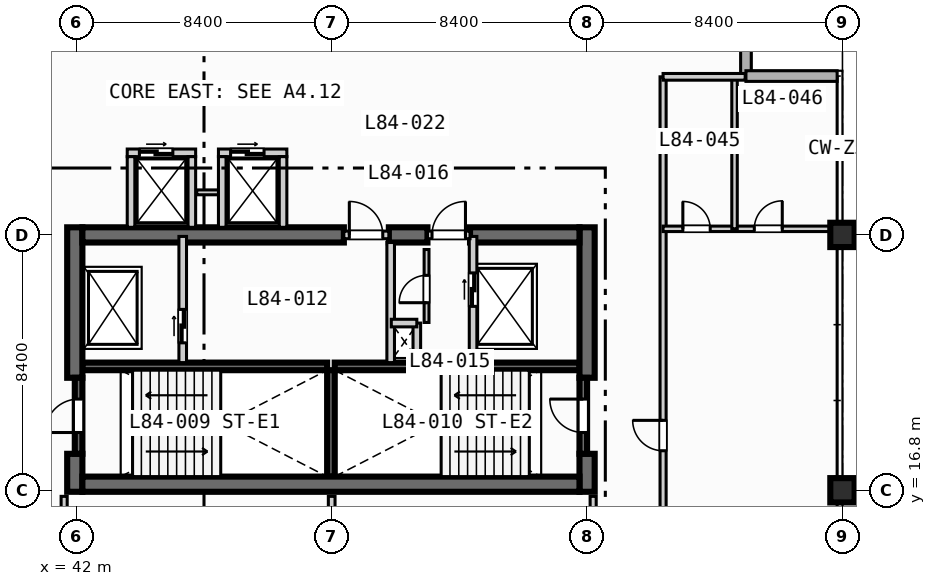
"""IFC4 building model, lengths in metres.
Left out: names, types, materials, properties, quantities, classifications, styles, units other than length and angle.
Written with IfcOpenShell. Run it as: python <this file> out.ifc"""

import sys

from ifc_helpers import new_model, si_unit, direction, frame, frame_2d, origin, origin_2d, place, context, subcontext, project, spatial, rectangle, extrude, element, fill, save


model = new_model("IFC4")
c1 = context("Model", 3, precision=1e-05, world=origin(), true_north=direction((0.0, 1.0)))
c2 = subcontext(c1, "Body", "Model", "MODEL_VIEW")
j1 = project(units=[si_unit("LENGTHUNIT", "METRE"), si_unit("PLANEANGLEUNIT", "RADIAN")], contexts=[c1])
p1 = place(None, origin())
s1 = spatial("IfcSite", under=j1, at=p1, CompositionType="ELEMENT")
p2 = place(p1, origin())
s2 = spatial("IfcBuilding", under=s1, at=p2, CompositionType="ELEMENT")
p3 = place(p2, frame((0.0, 0.0, 339.8)))
s3 = spatial("IfcBuildingStorey", under=s2, at=p3, CompositionType="ELEMENT", Elevation=339.8)
for number, where, z_axis, x_axis in (
    (1, (42.2, 20.875, 0.0), (0.0, 0.0, 1.0), (1.0, 0.0, 0.0)),
    (2, (50.5, 20.875, 0.0), (0.0, 0.0, 1.0), (1.0, 0.0, 0.0)),
):
    element("IfcWall", number, at=place(p3, frame(where, z_axis=z_axis, x_axis=x_axis)), inside=s3, PredefinedType="SOLIDWALL", context=c2, shape_type="SweptSolid", body=[
        extrude(rectangle(XDim=8.05, YDim=0.25, at=frame_2d((4.025, 0.0))), origin(), (0.0, 0.0, 1.0), 3.67),
    ])
p4 = place(p3, frame((50.375, 17.25, 0.0), z_axis=(0.0, 0.0, 1.0), x_axis=(0.0, 1.0, 0.0)))
e3 = element("IfcWall", 3, at=p4, inside=s3, PredefinedType="SOLIDWALL", context=c2, shape_type="SweptSolid", body=[
    extrude(rectangle(XDim=3.5, YDim=0.25, at=frame_2d((1.75, 0.0))), origin(), (0.0, 0.0, 1.0), 3.67),
])
p5 = place(p3, frame((41.95, 16.75, 0.0), z_axis=(0.0, 0.0, 1.0), x_axis=(0.0, 1.0, 0.0)))
e4 = element("IfcWall", 4, at=p5, inside=s3, PredefinedType="SHEAR", context=c2, shape_type="SweptSolid", body=[
    extrude(rectangle(XDim=1.25, YDim=0.5, at=frame_2d((0.625, 0.0))), origin(), (0.0, 0.0, 1.0), 3.67),
])
p6 = place(p3, frame((41.95, 20.5, 0.0), z_axis=(0.0, 0.0, 1.0), x_axis=(0.0, 1.0, 0.0)))
e5 = element("IfcWall", 5, at=p6, inside=s3, PredefinedType="SHEAR", context=c2, shape_type="SweptSolid", body=[
    extrude(rectangle(XDim=4.95, YDim=0.5, at=frame_2d((2.475, 0.0))), origin(), (0.0, 0.0, 1.0), 3.67),
])
p7 = place(p3, frame((58.8, 16.75, 0.0), z_axis=(0.0, 0.0, 1.0), x_axis=(0.0, 1.0, 0.0)))
e6 = element("IfcWall", 6, at=p7, inside=s3, PredefinedType="SHEAR", context=c2, shape_type="SweptSolid", body=[
    extrude(rectangle(XDim=1.25, YDim=0.5, at=frame_2d((0.625, 0.0))), origin(), (0.0, 0.0, 1.0), 3.67),
])
p8 = place(p3, frame((58.8, 20.5, 0.0), z_axis=(0.0, 0.0, 1.0), x_axis=(0.0, 1.0, 0.0)))
e7 = element("IfcWall", 7, at=p8, inside=s3, PredefinedType="SHEAR", context=c2, shape_type="SweptSolid", body=[
    extrude(rectangle(XDim=4.95, YDim=0.5, at=frame_2d((2.475, 0.0))), origin(), (0.0, 0.0, 1.0), 3.67),
])
p9 = place(p3, frame((42.2, 17.0, 0.0), z_axis=(0.0, 0.0, 1.0), x_axis=(1.0, 0.0, 0.0)))
e8 = element("IfcWall", 8, at=p9, inside=s3, PredefinedType="SHEAR", context=c2, shape_type="SweptSolid", body=[
    extrude(rectangle(XDim=16.35, YDim=0.5, at=frame_2d((8.175, 0.0))), origin(), (0.0, 0.0, 1.0), 3.67),
])
p10 = place(p3, frame((42.2, 25.2, 0.0), z_axis=(0.0, 0.0, 1.0), x_axis=(1.0, 0.0, 0.0)))
e9 = element("IfcWall", 9, at=p10, inside=s3, PredefinedType="SHEAR", context=c2, shape_type="SweptSolid", body=[
    extrude(rectangle(XDim=8.6, YDim=0.5, at=frame_2d((4.3, 0.0))), origin(), (0.0, 0.0, 1.0), 3.67),
])
p11 = place(p3, frame((52.28, 25.2, 0.0), z_axis=(0.0, 0.0, 1.0), x_axis=(1.0, 0.0, 0.0)))
e10 = element("IfcWall", 10, at=p11, inside=s3, PredefinedType="SHEAR", context=c2, shape_type="SweptSolid", body=[
    extrude(rectangle(XDim=1.27, YDim=0.5, at=frame_2d((0.635, 0.0))), origin(), (0.0, 0.0, 1.0), 3.67),
])
p12 = place(p3, frame((54.95, 25.2, 0.0), z_axis=(0.0, 0.0, 1.0), x_axis=(1.0, 0.0, 0.0)))
e11 = element("IfcWall", 11, at=p12, inside=s3, PredefinedType="SHEAR", context=c2, shape_type="SweptSolid", body=[
    extrude(rectangle(XDim=3.6, YDim=0.5, at=frame_2d((1.8, 0.0))), origin(), (0.0, 0.0, 1.0), 3.67),
])
for number, where, z_axis, x_axis in (
    (12, (67.2, 16.8, 0.0), (0.0, 0.0, 1.0), (1.0, 0.0, 0.0)),
    (13, (67.2, 25.2, 0.0), (0.0, 0.0, 1.0), (1.0, 0.0, 0.0)),
):
    element("IfcColumn", number, at=place(p3, frame(where, z_axis=z_axis, x_axis=x_axis)), inside=s3, PredefinedType="COLUMN", context=c2, shape_type="SweptSolid", body=[
        extrude(rectangle(XDim=0.8, YDim=0.8, at=origin_2d()), origin(), (0.0, 0.0, 1.0), 3.9),
    ])
for number, where, z_axis, x_axis in (
    (14, (64.025, 33.425, 0.0), (0.0, 0.0, 1.0), (0.0, -1.0, 0.0)),
    (15, (64.025, 30.425, 0.0), (0.0, 0.0, 1.0), (1.0, 0.0, 0.0)),
):
    element("IfcWall", number, at=place(p3, frame(where, z_axis=z_axis, x_axis=x_axis)), inside=s3, PredefinedType="STANDARD", context=c2, shape_type="SweptSolid", body=[
        extrude(rectangle(XDim=3.0, YDim=0.35, at=frame_2d((1.5, 0.0))), origin(), (0.0, 0.0, 1.0), 3.67),
    ])
p13 = place(p3, frame((42.075, 18.0, 0.0), z_axis=(0.0, 0.0, 1.0), x_axis=(0.0, 1.0, 0.0)))
e16 = element("IfcWall", 16, at=p13, inside=s3, PredefinedType="SOLIDWALL", context=c2, shape_type="SweptSolid", body=[
    extrude(rectangle(XDim=2.5, YDim=0.25, at=frame_2d((1.25, 0.0))), origin(), (0.0, 0.0, 1.0), 3.67),
])
p14 = place(p13, frame((0.7, 0.0, 0.0)))
e17 = element("IfcOpeningElement", 17, at=p14, cuts=e16, PredefinedType="OPENING", context=c2, shape_type="SweptSolid", body=[
    extrude(rectangle(XDim=1.1, YDim=2.15, at=frame_2d((0.55, 1.075))), frame((0.0, 0.135, 0.0), z_axis=(0.0, -1.0, 0.0), x_axis=(1.0, 0.0, 0.0)), (0.0, 0.0, 1.0), 0.27),
])
p15 = place(p3, frame((58.675, 18.0, 0.0), z_axis=(0.0, 0.0, 1.0), x_axis=(0.0, 1.0, 0.0)))
e18 = element("IfcWall", 18, at=p15, inside=s3, PredefinedType="SOLIDWALL", context=c2, shape_type="SweptSolid", body=[
    extrude(rectangle(XDim=2.5, YDim=0.25, at=frame_2d((1.25, 0.0))), origin(), (0.0, 0.0, 1.0), 3.67),
])
p16 = place(p15, frame((0.7, 0.0, 0.0)))
e19 = element("IfcOpeningElement", 19, at=p16, cuts=e18, PredefinedType="OPENING", context=c2, shape_type="SweptSolid", body=[
    extrude(rectangle(XDim=1.1, YDim=2.15, at=frame_2d((0.55, 1.075))), frame((0.0, 0.135, 0.0), z_axis=(0.0, -1.0, 0.0), x_axis=(1.0, 0.0, 0.0)), (0.0, 0.0, 1.0), 0.27),
])
p17 = place(p3, frame((45.5, 21.0, 0.0), z_axis=(0.0, 0.0, 1.0), x_axis=(0.0, 1.0, 0.0)))
e20 = element("IfcWall", 20, at=p17, inside=s3, PredefinedType="SOLIDWALL", context=c2, shape_type="SweptSolid", body=[
    extrude(rectangle(XDim=4.15, YDim=0.25, at=frame_2d((2.075, 0.0))), origin(), (0.0, 0.0, 1.0), 3.67),
])
p18 = place(p17, frame((0.65, 0.0, 0.0)))
e21 = element("IfcOpeningElement", 21, at=p18, cuts=e20, PredefinedType="OPENING", context=c2, shape_type="SweptSolid", body=[
    extrude(rectangle(XDim=1.1, YDim=2.15, at=frame_2d((0.55, 1.075))), frame((0.0, 0.135, 0.0), z_axis=(0.0, -1.0, 0.0), x_axis=(1.0, 0.0, 0.0)), (0.0, 0.0, 1.0), 0.27),
])
p19 = place(p3, frame((50.8, 25.2, 0.0), z_axis=(0.0, 0.0, 1.0), x_axis=(1.0, 0.0, 0.0)))
e22 = element("IfcWall", 22, at=p19, inside=s3, PredefinedType="SOLIDWALL", context=c2, shape_type="SweptSolid", body=[
    extrude(rectangle(XDim=1.48, YDim=0.25, at=frame_2d((0.74, 0.0))), origin(), (0.0, 0.0, 1.0), 3.67),
])
p20 = place(p19, frame((0.18, 0.0, 0.0)))
e23 = element("IfcOpeningElement", 23, at=p20, cuts=e22, PredefinedType="OPENING", context=c2, shape_type="SweptSolid", body=[
    extrude(rectangle(XDim=1.1, YDim=2.15, at=frame_2d((0.55, 1.075))), frame((0.0, 0.135, 0.0), z_axis=(0.0, -1.0, 0.0), x_axis=(1.0, 0.0, 0.0)), (0.0, 0.0, 1.0), 0.27),
])
p21 = place(p3, frame((52.34, 21.0, 0.0), z_axis=(0.0, 0.0, 1.0), x_axis=(0.0, 1.0, 0.0)))
e24 = element("IfcWall", 24, at=p21, inside=s3, PredefinedType="SOLIDWALL", context=c2, shape_type="SweptSolid", body=[
    extrude(rectangle(XDim=3.95, YDim=0.25, at=frame_2d((1.975, 0.0))), origin(), (0.0, 0.0, 1.0), 3.67),
])
p22 = place(p3, frame((55.05, 21.0, 0.0), z_axis=(0.0, 0.0, 1.0), x_axis=(0.0, 1.0, 0.0)))
e25 = element("IfcWall", 25, at=p22, inside=s3, PredefinedType="SOLIDWALL", context=c2, shape_type="SweptSolid", body=[
    extrude(rectangle(XDim=4.15, YDim=0.25, at=frame_2d((2.075, 0.0))), origin(), (0.0, 0.0, 1.0), 3.67),
])
p23 = place(p22, frame((1.85, 0.0, 0.0)))
e26 = element("IfcOpeningElement", 26, at=p23, cuts=e25, PredefinedType="OPENING", context=c2, shape_type="SweptSolid", body=[
    extrude(rectangle(XDim=1.1, YDim=2.15, at=frame_2d((0.55, 1.075))), frame((0.0, 0.135, 0.0), z_axis=(0.0, -1.0, 0.0), x_axis=(1.0, 0.0, 0.0)), (0.0, 0.0, 1.0), 0.27),
])
p24 = place(p3, frame((53.55, 25.2, 0.0), z_axis=(0.0, 0.0, 1.0), x_axis=(1.0, 0.0, 0.0)))
e27 = element("IfcWall", 27, at=p24, inside=s3, PredefinedType="SOLIDWALL", context=c2, shape_type="SweptSolid", body=[
    extrude(rectangle(XDim=1.4, YDim=0.25, at=frame_2d((0.7, 0.0))), origin(), (0.0, 0.0, 1.0), 3.67),
])
p25 = place(p24, frame((0.15, 0.0, 0.0)))
e28 = element("IfcOpeningElement", 28, at=p25, cuts=e27, PredefinedType="OPENING", context=c2, shape_type="SweptSolid", body=[
    extrude(rectangle(XDim=1.1, YDim=2.15, at=frame_2d((0.55, 1.075))), frame((0.0, 0.135, 0.0), z_axis=(0.0, -1.0, 0.0), x_axis=(1.0, 0.0, 0.0)), (0.0, 0.0, 1.0), 0.27),
])
p26 = place(p3, frame((53.2, 21.0, 0.0), z_axis=(0.0, 0.0, 1.0), x_axis=(0.0, 1.0, 0.0)))
e29 = element("IfcWall", 29, at=p26, inside=s3, PredefinedType="SOLIDWALL", context=c2, shape_type="SweptSolid", body=[
    extrude(rectangle(XDim=1.3, YDim=0.25, at=frame_2d((0.65, 0.0))), origin(), (0.0, 0.0, 1.0), 3.67),
])
p27 = place(p3, frame((52.36, 22.3, 0.0), z_axis=(0.0, 0.0, 1.0), x_axis=(1.0, 0.0, 0.0)))
e30 = element("IfcWall", 30, at=p27, inside=s3, PredefinedType="SOLIDWALL", context=c2, shape_type="SweptSolid", body=[
    extrude(rectangle(XDim=0.84, YDim=0.25, at=frame_2d((0.42, 0.0))), origin(), (0.0, 0.0, 1.0), 3.67),
])
p28 = place(p3, frame((53.52, 22.32, 0.0), z_axis=(0.0, 0.0, 1.0), x_axis=(0.0, 1.0, 0.0)))
e31 = element("IfcWall", 31, at=p28, inside=s3, PredefinedType="PARTITIONING", context=c2, shape_type="SweptSolid", body=[
    extrude(rectangle(XDim=2.4, YDim=0.16, at=frame_2d((1.2, 0.0))), origin(), (0.0, 0.0, 1.0), 3.67),
])
p29 = place(p28, frame((0.65, 0.0, 0.0)))
e32 = element("IfcOpeningElement", 32, at=p29, cuts=e31, PredefinedType="OPENING", context=c2, shape_type="SweptSolid", body=[
    extrude(rectangle(XDim=0.9, YDim=2.1, at=frame_2d((0.45, 1.05))), frame((0.0, 0.09, 0.0), z_axis=(0.0, -1.0, 0.0), x_axis=(1.0, 0.0, 0.0)), (0.0, 0.0, 1.0), 0.18),
])
p30 = place(p3, frame((43.675, 27.9, 0.0), z_axis=(0.0, 0.0, 1.0), x_axis=(1.0, 0.0, 0.0)))
e33 = element("IfcWall", 33, at=p30, inside=s3, PredefinedType="SOLIDWALL", context=c2, shape_type="SweptSolid", body=[
    extrude(rectangle(XDim=2.25, YDim=0.25, at=frame_2d((1.125, 0.0))), origin(), (0.0, 0.0, 1.0), 3.67),
])
p31 = place(p30, frame((0.4, 0.0, 0.0)))
e34 = element("IfcOpeningElement", 34, at=p31, cuts=e33, PredefinedType="OPENING", context=c2, shape_type="SweptSolid", body=[
    extrude(rectangle(XDim=1.1, YDim=2.15, at=frame_2d((0.55, 1.075))), frame((0.0, 0.135, 0.0), z_axis=(0.0, -1.0, 0.0), x_axis=(1.0, 0.0, 0.0)), (0.0, 0.0, 1.0), 0.27),
])
for number, where, z_axis, x_axis in (
    (35, (43.8, 25.45, 0.0), (0.0, 0.0, 1.0), (0.0, 1.0, 0.0)),
    (36, (45.8, 25.45, 0.0), (0.0, 0.0, 1.0), (0.0, 1.0, 0.0)),
):
    element("IfcWall", number, at=place(p3, frame(where, z_axis=z_axis, x_axis=x_axis)), inside=s3, PredefinedType="SOLIDWALL", context=c2, shape_type="SweptSolid", body=[
        extrude(rectangle(XDim=2.325, YDim=0.25, at=frame_2d((1.163, 0.0))), origin(), (0.0, 0.0, 1.0), 3.67),
    ])
p32 = place(p3, frame((45.96, 26.6, 0.0), z_axis=(0.0, 0.0, 1.0), x_axis=(1.0, 0.0, 0.0)))
e37 = element("IfcWall", 37, at=p32, inside=s3, PredefinedType="PARTITIONING", context=c2, shape_type="SweptSolid", body=[
    extrude(rectangle(XDim=0.88, YDim=0.16, at=frame_2d((0.44, 0.0))), origin(), (0.0, 0.0, 1.0), 3.67),
])
p33 = place(p3, frame((46.675, 27.9, 0.0), z_axis=(0.0, 0.0, 1.0), x_axis=(1.0, 0.0, 0.0)))
e38 = element("IfcWall", 38, at=p33, inside=s3, PredefinedType="SOLIDWALL", context=c2, shape_type="SweptSolid", body=[
    extrude(rectangle(XDim=2.25, YDim=0.25, at=frame_2d((1.125, 0.0))), origin(), (0.0, 0.0, 1.0), 3.67),
])
p34 = place(p33, frame((0.4, 0.0, 0.0)))
e39 = element("IfcOpeningElement", 39, at=p34, cuts=e38, PredefinedType="OPENING", context=c2, shape_type="SweptSolid", body=[
    extrude(rectangle(XDim=1.1, YDim=2.15, at=frame_2d((0.55, 1.075))), frame((0.0, 0.135, 0.0), z_axis=(0.0, -1.0, 0.0), x_axis=(1.0, 0.0, 0.0)), (0.0, 0.0, 1.0), 0.27),
])
for number, where, z_axis, x_axis in (
    (40, (46.8, 25.45, 0.0), (0.0, 0.0, 1.0), (0.0, 1.0, 0.0)),
    (41, (48.8, 25.45, 0.0), (0.0, 0.0, 1.0), (0.0, 1.0, 0.0)),
):
    element("IfcWall", number, at=place(p3, frame(where, z_axis=z_axis, x_axis=x_axis)), inside=s3, PredefinedType="SOLIDWALL", context=c2, shape_type="SweptSolid", body=[
        extrude(rectangle(XDim=2.325, YDim=0.25, at=frame_2d((1.163, 0.0))), origin(), (0.0, 0.0, 1.0), 3.67),
    ])
p35 = place(p3, frame((41.6, 8.65, 0.0), z_axis=(0.0, 0.0, 1.0), x_axis=(0.0, 1.0, 0.0)))
e42 = element("IfcWall", 42, at=p35, inside=s3, PredefinedType="PARTITIONING", context=c2, shape_type="SweptSolid", body=[
    extrude(rectangle(XDim=7.95, YDim=0.2, at=frame_2d((3.975, 0.0))), origin(), (0.0, 0.0, 1.0), 3.67),
])
p36 = place(p35, frame((2.2, 0.0, 0.0)))
e43 = element("IfcOpeningElement", 43, at=p36, cuts=e42, PredefinedType="OPENING", context=c2, shape_type="SweptSolid", body=[
    extrude(rectangle(XDim=0.92, YDim=2.1, at=frame_2d((0.46, 1.05))), frame((0.0, 0.11, 0.0), z_axis=(0.0, -1.0, 0.0), x_axis=(1.0, 0.0, 0.0)), (0.0, 0.0, 1.0), 0.22),
])
p37 = place(p3, frame((59.0, 8.65, 0.0), z_axis=(0.0, 0.0, 1.0), x_axis=(0.0, 1.0, 0.0)))
e44 = element("IfcWall", 44, at=p37, inside=s3, PredefinedType="PARTITIONING", context=c2, shape_type="SweptSolid", body=[
    extrude(rectangle(XDim=7.95, YDim=0.2, at=frame_2d((3.975, 0.0))), origin(), (0.0, 0.0, 1.0), 3.207),
])
p38 = place(p37, frame((2.2, 0.0, 0.0)))
e45 = element("IfcOpeningElement", 45, at=p38, cuts=e44, PredefinedType="OPENING", context=c2, shape_type="SweptSolid", body=[
    extrude(rectangle(XDim=0.92, YDim=2.1, at=frame_2d((0.46, 1.05))), frame((0.0, 0.11, 0.0), z_axis=(0.0, -1.0, 0.0), x_axis=(1.0, 0.0, 0.0)), (0.0, 0.0, 1.0), 0.22),
])
p39 = place(p3, frame((50.4, 8.65, 0.0), z_axis=(0.0, 0.0, 1.0), x_axis=(0.0, 1.0, 0.0)))
e46 = element("IfcWall", 46, at=p39, inside=s3, PredefinedType="PARTITIONING", context=c2, shape_type="SweptSolid", body=[
    extrude(rectangle(XDim=7.95, YDim=0.22, at=frame_2d((3.975, 0.0))), origin(), (0.0, 0.0, 1.0), 3.07),
])
p40 = place(p3, frame((61.3, 11.6, 0.0), z_axis=(0.0, 0.0, 1.0), x_axis=(0.0, 1.0, 0.0)))
e47 = element("IfcWall", 47, at=p40, inside=s3, PredefinedType="PARTITIONING", context=c2, shape_type="SweptSolid", body=[
    extrude(rectangle(XDim=18.8, YDim=0.2, at=frame_2d((9.4, 0.0))), origin(), (0.0, 0.0, 1.0), 3.67),
])
p41 = place(p40, frame((6.5, 0.0, 0.0)))
e48 = element("IfcOpeningElement", 48, at=p41, cuts=e47, PredefinedType="OPENING", context=c2, shape_type="SweptSolid", body=[
    extrude(rectangle(XDim=1.0, YDim=2.15, at=frame_2d((0.5, 1.075))), frame((0.0, 0.11, 0.0), z_axis=(0.0, -1.0, 0.0), x_axis=(1.0, 0.0, 0.0)), (0.0, 0.0, 1.0), 0.22),
])
p42 = place(p3, frame((61.3, 25.4, 0.0), z_axis=(0.0, 0.0, 1.0), x_axis=(1.0, 0.0, 0.0)))
e49 = element("IfcWall", 49, at=p42, inside=s3, PredefinedType="PLUMBINGWALL", context=c2, shape_type="SweptSolid", body=[
    extrude(rectangle(XDim=5.5, YDim=0.18, at=frame_2d((2.75, 0.0))), origin(), (0.0, 0.0, 1.0), 3.07),
])
p43 = place(p42, frame((0.65, 0.0, 0.0)))
e50 = element("IfcOpeningElement", 50, at=p43, cuts=e49, PredefinedType="OPENING", context=c2, shape_type="SweptSolid", body=[
    extrude(rectangle(XDim=0.9, YDim=2.1, at=frame_2d((0.45, 1.05))), frame((0.0, 0.1, 0.0), z_axis=(0.0, -1.0, 0.0), x_axis=(1.0, 0.0, 0.0)), (0.0, 0.0, 1.0), 0.2),
])
p44 = place(p42, frame((3.0, 0.0, 0.0)))
e51 = element("IfcOpeningElement", 51, at=p44, cuts=e49, PredefinedType="OPENING", context=c2, shape_type="SweptSolid", body=[
    extrude(rectangle(XDim=0.92, YDim=2.1, at=frame_2d((0.46, 1.05))), frame((0.0, 0.1, 0.0), z_axis=(0.0, -1.0, 0.0), x_axis=(1.0, 0.0, 0.0)), (0.0, 0.0, 1.0), 0.2),
])
p45 = place(p3, frame((63.65, 25.4, 0.0), z_axis=(0.0, 0.0, 1.0), x_axis=(0.0, 1.0, 0.0)))
e52 = element("IfcWall", 52, at=p45, inside=s3, PredefinedType="PLUMBINGWALL", context=c2, shape_type="SweptSolid", body=[
    extrude(rectangle(XDim=5.0, YDim=0.18, at=frame_2d((2.5, 0.0))), origin(), (0.0, 0.0, 1.0), 3.67),
])
p46 = place(p3, frame((61.3, 30.4, 0.0), z_axis=(0.0, 0.0, 1.0), x_axis=(1.0, 0.0, 0.0)))
e53 = element("IfcWall", 53, at=p46, inside=s3, PredefinedType="PARTITIONING", context=c2, shape_type="SweptSolid", body=[
    extrude(rectangle(XDim=2.7, YDim=0.22, at=frame_2d((1.35, 0.0))), origin(), (0.0, 0.0, 1.0), 3.67),
])
p47 = place(p14, origin())
e54 = element("IfcDoor", 54, at=p47, inside=s3, OperationType="SINGLE_SWING_LEFT", PredefinedType="DOOR", context=c2, shape_type="SweptSolid", body=[
    extrude(rectangle(XDim=1.1, YDim=2.15, at=frame_2d((0.55, 1.075))), frame((0.0, 0.025, 0.0), z_axis=(0.0, -1.0, 0.0), x_axis=(1.0, 0.0, 0.0)), (0.0, 0.0, 1.0), 0.05),
])
fill(e17, e54)
p48 = place(p16, origin())
e55 = element("IfcDoor", 55, at=p48, inside=s3, OperationType="SINGLE_SWING_RIGHT", PredefinedType="DOOR", context=c2, shape_type="SweptSolid", body=[
    extrude(rectangle(XDim=1.1, YDim=2.15, at=frame_2d((0.55, 1.075))), frame((0.0, 0.025, 0.0), z_axis=(0.0, -1.0, 0.0), x_axis=(1.0, 0.0, 0.0)), (0.0, 0.0, 1.0), 0.05),
])
fill(e19, e55)
p49 = place(p18, origin())
e56 = element("IfcDoor", 56, at=p49, inside=s3, OperationType="SLIDING_TO_LEFT", PredefinedType="DOOR", context=c2, shape_type="SweptSolid", body=[
    extrude(rectangle(XDim=1.1, YDim=2.15, at=frame_2d((0.55, 1.075))), frame((0.0, 0.025, 0.0), z_axis=(0.0, -1.0, 0.0), x_axis=(1.0, 0.0, 0.0)), (0.0, 0.0, 1.0), 0.05),
])
fill(e21, e56)
p50 = place(p20, origin())
e57 = element("IfcDoor", 57, at=p50, inside=s3, OperationType="SINGLE_SWING_LEFT", PredefinedType="DOOR", context=c2, shape_type="SweptSolid", body=[
    extrude(rectangle(XDim=1.1, YDim=2.15, at=frame_2d((0.55, 1.075))), frame((0.0, 0.025, 0.0), z_axis=(0.0, -1.0, 0.0), x_axis=(1.0, 0.0, 0.0)), (0.0, 0.0, 1.0), 0.05),
])
fill(e23, e57)
p51 = place(p23, origin())
e58 = element("IfcDoor", 58, at=p51, inside=s3, OperationType="SLIDING_TO_LEFT", PredefinedType="DOOR", context=c2, shape_type="SweptSolid", body=[
    extrude(rectangle(XDim=1.1, YDim=2.15, at=frame_2d((0.55, 1.075))), frame((0.0, 0.025, 0.0), z_axis=(0.0, -1.0, 0.0), x_axis=(1.0, 0.0, 0.0)), (0.0, 0.0, 1.0), 0.05),
])
fill(e26, e58)
p52 = place(p25, origin())
e59 = element("IfcDoor", 59, at=p52, inside=s3, OperationType="SINGLE_SWING_RIGHT", PredefinedType="DOOR", context=c2, shape_type="SweptSolid", body=[
    extrude(rectangle(XDim=1.1, YDim=2.15, at=frame_2d((0.55, 1.075))), frame((0.0, 0.025, 0.0), z_axis=(0.0, -1.0, 0.0), x_axis=(1.0, 0.0, 0.0)), (0.0, 0.0, 1.0), 0.05),
])
fill(e28, e59)
p53 = place(p29, origin())
e60 = element("IfcDoor", 60, at=p53, inside=s3, OperationType="SINGLE_SWING_LEFT", PredefinedType="DOOR", context=c2, shape_type="SweptSolid", body=[
    extrude(rectangle(XDim=0.9, YDim=2.1, at=frame_2d((0.45, 1.05))), frame((0.0, 0.025, 0.0), z_axis=(0.0, -1.0, 0.0), x_axis=(1.0, 0.0, 0.0)), (0.0, 0.0, 1.0), 0.05),
])
fill(e32, e60)
p54 = place(p31, origin())
e61 = element("IfcDoor", 61, at=p54, inside=s3, OperationType="SLIDING_TO_LEFT", PredefinedType="DOOR", context=c2, shape_type="SweptSolid", body=[
    extrude(rectangle(XDim=1.1, YDim=2.15, at=frame_2d((0.55, 1.075))), frame((0.0, 0.025, 0.0), z_axis=(0.0, -1.0, 0.0), x_axis=(1.0, 0.0, 0.0)), (0.0, 0.0, 1.0), 0.05),
])
fill(e34, e61)
p55 = place(p34, origin())
e62 = element("IfcDoor", 62, at=p55, inside=s3, OperationType="SLIDING_TO_LEFT", PredefinedType="DOOR", context=c2, shape_type="SweptSolid", body=[
    extrude(rectangle(XDim=1.1, YDim=2.15, at=frame_2d((0.55, 1.075))), frame((0.0, 0.025, 0.0), z_axis=(0.0, -1.0, 0.0), x_axis=(1.0, 0.0, 0.0)), (0.0, 0.0, 1.0), 0.05),
])
fill(e39, e62)
p56 = place(p41, origin())
e63 = element("IfcDoor", 63, at=p56, inside=s3, OperationType="SINGLE_SWING_RIGHT", PredefinedType="DOOR", context=c2, shape_type="SweptSolid", body=[
    extrude(rectangle(XDim=1.0, YDim=2.15, at=frame_2d((0.5, 1.075))), frame((0.0, 0.025, 0.0), z_axis=(0.0, -1.0, 0.0), x_axis=(1.0, 0.0, 0.0)), (0.0, 0.0, 1.0), 0.05),
])
fill(e48, e63)
p57 = place(p43, origin())
e64 = element("IfcDoor", 64, at=p57, inside=s3, OperationType="SINGLE_SWING_LEFT", PredefinedType="DOOR", context=c2, shape_type="SweptSolid", body=[
    extrude(rectangle(XDim=0.9, YDim=2.1, at=frame_2d((0.45, 1.05))), frame((0.0, 0.025, 0.0), z_axis=(0.0, -1.0, 0.0), x_axis=(1.0, 0.0, 0.0)), (0.0, 0.0, 1.0), 0.05),
])
fill(e50, e64)
p58 = place(p44, origin())
e65 = element("IfcDoor", 65, at=p58, inside=s3, OperationType="SINGLE_SWING_RIGHT", PredefinedType="DOOR", context=c2, shape_type="SweptSolid", body=[
    extrude(rectangle(XDim=0.92, YDim=2.1, at=frame_2d((0.46, 1.05))), frame((0.0, 0.025, 0.0), z_axis=(0.0, -1.0, 0.0), x_axis=(1.0, 0.0, 0.0)), (0.0, 0.0, 1.0), 0.05),
])
fill(e51, e65)
save(model, sys.argv[1])
